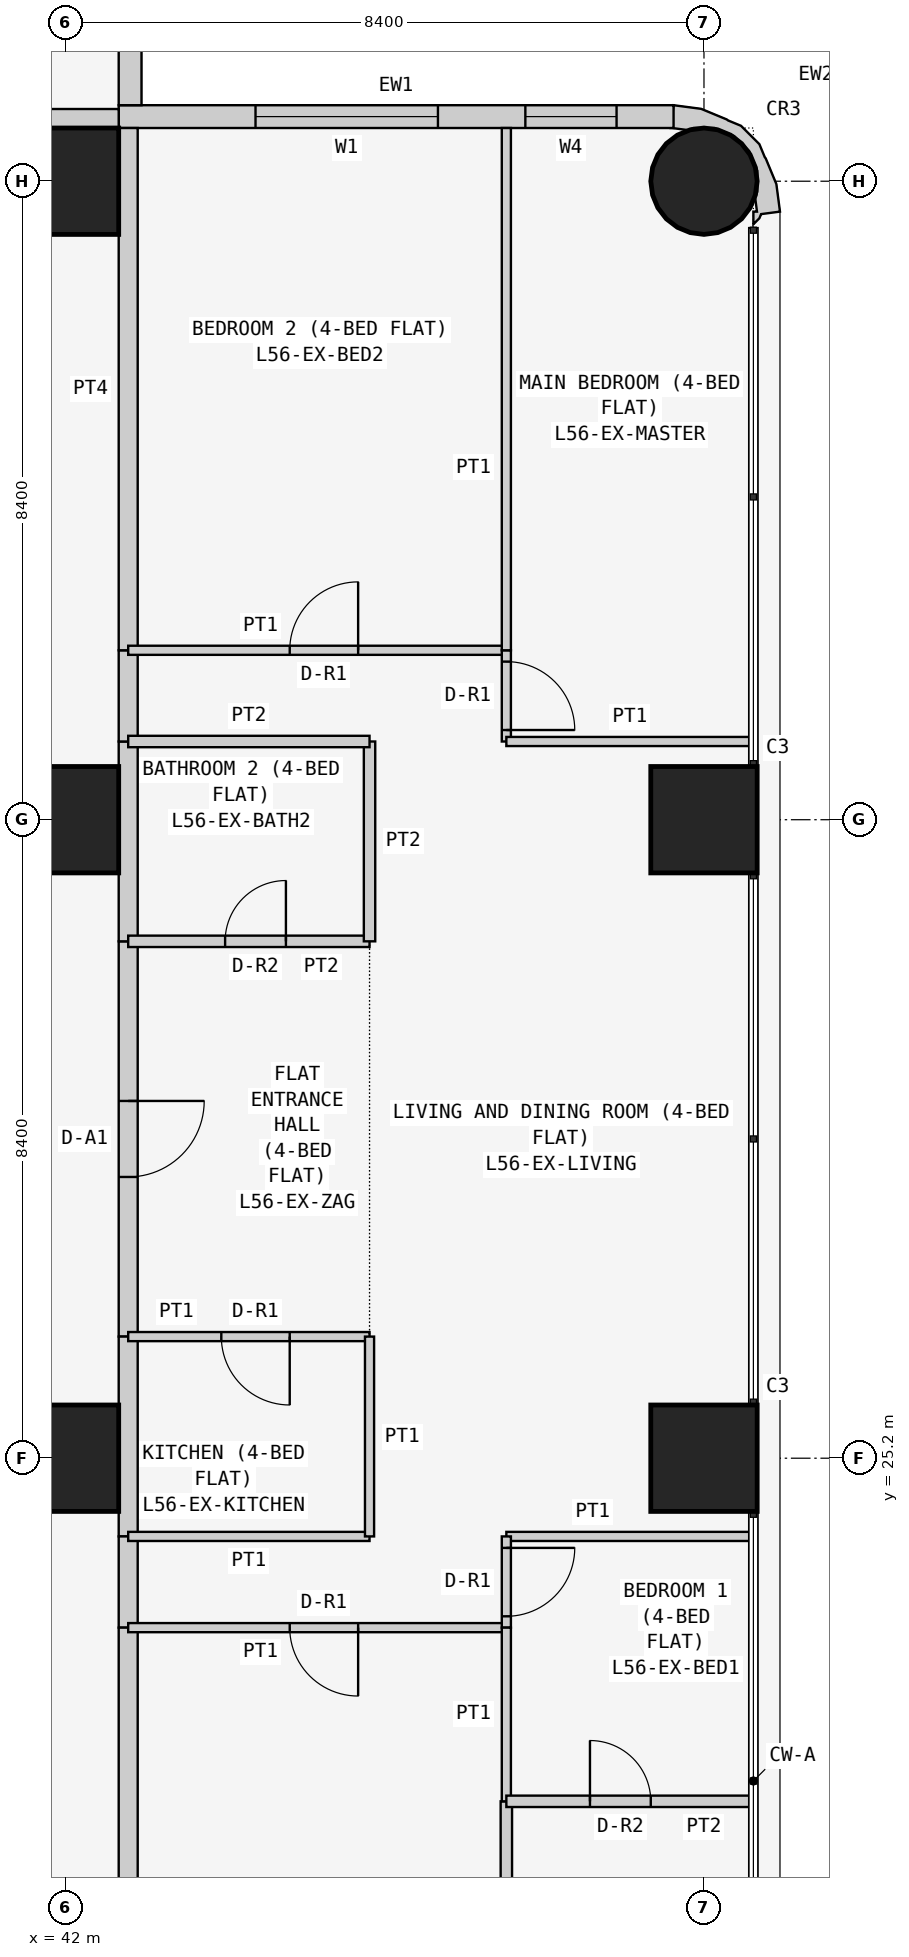
"""IFC4 building model, lengths in metres.
Left out: names, types, materials, properties, quantities, classifications, styles, units other than length and angle.
Written with IfcOpenShell. Run it as: python <this file> out.ifc"""

import sys

from ifc_helpers import new_model, si_unit, direction, frame, frame_2d, origin, origin_2d, place, context, subcontext, project, spatial, polyline, rectangle, circle, outline, extrude, element, fill, save


model = new_model("IFC4")
c1 = context("Model", 3, precision=1e-05, world=origin(), true_north=direction((0.0, 1.0)))
c2 = subcontext(c1, "Body", "Model", "MODEL_VIEW")
j1 = project(units=[si_unit("LENGTHUNIT", "METRE"), si_unit("PLANEANGLEUNIT", "RADIAN")], contexts=[c1])
p1 = place(None, origin())
s1 = spatial("IfcSite", under=j1, at=p1, CompositionType="ELEMENT")
p2 = place(p1, origin())
s2 = spatial("IfcBuilding", under=s1, at=p2, CompositionType="ELEMENT")
p3 = place(p2, frame((0.0, 0.0, 215.7)))
s3 = spatial("IfcBuildingStorey", under=s2, at=p3, CompositionType="ELEMENT", Elevation=215.7)
for number, where, z_axis, x_axis in (
    (1, (42.0, 25.2, 0.0), (0.0, 0.0, 1.0), (1.0, 0.0, 0.0)),
    (2, (42.0, 33.6, 0.0), (0.0, 0.0, 1.0), (1.0, 0.0, 0.0)),
    (3, (42.0, 42.0, 0.0), (0.0, 0.0, 1.0), (1.0, 0.0, 0.0)),
    (4, (50.4, 25.2, 0.0), (0.0, 0.0, 1.0), (1.0, 0.0, 0.0)),
    (5, (50.4, 33.6, 0.0), (0.0, 0.0, 1.0), (1.0, 0.0, 0.0)),
):
    element("IfcColumn", number, at=place(p3, frame(where, z_axis=z_axis, x_axis=x_axis)), inside=s3, PredefinedType="COLUMN", context=c2, shape_type="SweptSolid", body=[
        extrude(rectangle(XDim=1.4, YDim=1.4, at=origin_2d()), origin(), (0.0, 0.0, 1.0), 3.6),
    ])
p4 = place(p3, frame((50.4, 42.0, 0.0), z_axis=(0.0, 0.0, 1.0), x_axis=(1.0, 0.0, 0.0)))
e6 = element("IfcColumn", 6, at=p4, inside=s3, PredefinedType="COLUMN", context=c2, shape_type="SweptSolid", body=[
    extrude(circle(Radius=0.7, at=origin_2d()), origin(), (0.0, 0.0, 1.0), 3.6),
])
p5 = place(p3, frame((50.0, 42.85, 0.0), z_axis=(0.0, 0.0, 1.0), x_axis=(-1.0, 0.0, 0.0)))
e7 = element("IfcWall", 7, at=p5, inside=s3, PredefinedType="SOLIDWALL", context=c2, shape_type="SweptSolid", body=[
    extrude(rectangle(XDim=7.3, YDim=0.3, at=frame_2d((3.65, 0.0))), origin(), (0.0, 0.0, 1.0), 3.45),
])
p6 = place(p5, frame((3.1, 0.0, 0.9)))
e8 = element("IfcOpeningElement", 8, at=p6, cuts=e7, PredefinedType="OPENING", context=c2, shape_type="SweptSolid", body=[
    extrude(rectangle(XDim=2.4, YDim=1.5, at=frame_2d((1.2, 0.75))), frame((0.0, 0.16, 0.0), z_axis=(0.0, -1.0, 0.0), x_axis=(1.0, 0.0, 0.0)), (0.0, 0.0, 1.0), 0.32),
])
p7 = place(p5, frame((0.75, 0.0, 0.9)))
e9 = element("IfcOpeningElement", 9, at=p7, cuts=e7, PredefinedType="OPENING", context=c2, shape_type="SweptSolid", body=[
    extrude(rectangle(XDim=1.2, YDim=1.5, at=frame_2d((0.6, 0.75))), frame((0.0, 0.16, 0.0), z_axis=(0.0, -1.0, 0.0), x_axis=(1.0, 0.0, 0.0)), (0.0, 0.0, 1.0), 0.32),
])
p8 = place(p3, frame((42.85, 43.0, 0.0), z_axis=(0.0, 0.0, 1.0), x_axis=(0.0, 1.0, 0.0)))
e10 = element("IfcWall", 10, at=p8, inside=s3, PredefinedType="SOLIDWALL", context=c2, shape_type="SweptSolid", body=[
    extrude(rectangle(XDim=7.0, YDim=0.3, at=frame_2d((3.5, 0.0))), origin(), (0.0, 0.0, 1.0), 3.45),
])
p9 = place(p8, frame((1.5, 0.0, 0.9)))
e11 = element("IfcOpeningElement", 11, at=p9, cuts=e10, PredefinedType="OPENING", context=c2, shape_type="SweptSolid", body=[
    extrude(rectangle(XDim=2.4, YDim=1.5, at=frame_2d((1.2, 0.75))), frame((0.0, 0.16, 0.0), z_axis=(0.0, -1.0, 0.0), x_axis=(1.0, 0.0, 0.0)), (0.0, 0.0, 1.0), 0.32),
])
p10 = place(p8, frame((5.05, 0.0, 0.9)))
e12 = element("IfcOpeningElement", 12, at=p10, cuts=e10, PredefinedType="OPENING", context=c2, shape_type="SweptSolid", body=[
    extrude(rectangle(XDim=1.2, YDim=1.5, at=frame_2d((0.6, 0.75))), frame((0.0, 0.16, 0.0), z_axis=(0.0, -1.0, 0.0), x_axis=(1.0, 0.0, 0.0)), (0.0, 0.0, 1.0), 0.32),
])
p11 = place(p3, frame((50.988, 41.488, 0.0), z_axis=(0.0, 0.0, 1.0), x_axis=(0.898030234854, 0.439933741929, 0.0)))
e13 = element("IfcWall", 13, at=p11, inside=s3, PredefinedType="SOLIDWALL", context=c2, shape_type="SweptSolid", body=[
    extrude(outline(polyline([(0.138, -0.04), (0.182, -0.0), (0.419, -0.08), (0.536, 0.266), (0.559, 0.631), (0.555, 0.651), (0.566, 0.836), (0.455, 1.159), (0.333, 1.298), (0.324, 1.317), (0.082, 1.591), (-0.222, 1.793), (-0.39, 1.541), (-0.372, 1.532), (-0.195, 1.414), (-0.12, 1.41), (0.131, 1.287), (0.315, 1.078), (0.406, 0.814), (0.388, 0.536), (0.265, 0.285), (0.209, 0.235), (0.148, 0.053), (0.105, 0.074), (0.032, -0.076), (0.138, -0.04)])), origin(), (0.0, 0.0, 1.0), 3.45),
])
p12 = place(p3, frame((35.829, 42.825, 0.0), z_axis=(0.0, 0.0, 1.0), x_axis=(1.0, 0.0, 0.0)))
e14 = element("IfcWall", 14, at=p12, inside=s3, PredefinedType="PARTITIONING", context=c2, shape_type="SweptSolid", body=[
    extrude(rectangle(XDim=6.871, YDim=0.25, at=frame_2d((3.436, 0.0))), origin(), (0.0, 0.0, 1.0), 3.45),
])
p13 = place(p3, frame((42.825, 32.0, 0.0), z_axis=(0.0, 0.0, 1.0), x_axis=(0.0, -1.0, 0.0)))
e15 = element("IfcWall", 15, at=p13, inside=s3, PredefinedType="PARTITIONING", context=c2, shape_type="SweptSolid", body=[
    extrude(rectangle(XDim=5.2, YDim=0.25, at=frame_2d((2.6, 0.0))), origin(), (0.0, 0.0, 1.0), 3.45),
])
p14 = place(p13, frame((2.1, 0.0, 0.0)))
e16 = element("IfcOpeningElement", 16, at=p14, cuts=e15, PredefinedType="OPENING", context=c2, shape_type="SweptSolid", body=[
    extrude(rectangle(XDim=1.0, YDim=2.1, at=frame_2d((0.5, 1.05))), frame((0.0, 0.135, 0.0), z_axis=(0.0, -1.0, 0.0), x_axis=(1.0, 0.0, 0.0)), (0.0, 0.0, 1.0), 0.27),
])
p15 = place(p3, frame((42.825, 34.629, 0.0), z_axis=(0.0, 0.0, 1.0), x_axis=(0.0, -1.0, 0.0)))
e17 = element("IfcWall", 17, at=p15, inside=s3, PredefinedType="PARTITIONING", context=c2, shape_type="SweptSolid", body=[
    extrude(rectangle(XDim=2.629, YDim=0.25, at=frame_2d((1.314, 0.0))), origin(), (0.0, 0.0, 1.0), 3.45),
])
p16 = place(p3, frame((42.825, 26.8, 0.0), z_axis=(0.0, 0.0, 1.0), x_axis=(0.0, -1.0, 0.0)))
e18 = element("IfcWall", 18, at=p16, inside=s3, PredefinedType="PARTITIONING", context=c2, shape_type="SweptSolid", body=[
    extrude(rectangle(XDim=2.629, YDim=0.25, at=frame_2d((1.314, 0.0))), origin(), (0.0, 0.0, 1.0), 3.45),
])
p17 = place(p3, frame((42.825, 24.171, 0.0), z_axis=(0.0, 0.0, 1.0), x_axis=(0.0, -1.0, 0.0)))
e19 = element("IfcWall", 19, at=p17, inside=s3, PredefinedType="PARTITIONING", context=c2, shape_type="SweptSolid", body=[
    extrude(rectangle(XDim=1.2, YDim=0.25, at=frame_2d((0.6, 0.0))), origin(), (0.0, 0.0, 1.0), 3.45),
])
p18 = place(p3, frame((42.825, 35.829, 0.0), z_axis=(0.0, 0.0, 1.0), x_axis=(0.0, -1.0, 0.0)))
e20 = element("IfcWall", 20, at=p18, inside=s3, PredefinedType="PARTITIONING", context=c2, shape_type="SweptSolid", body=[
    extrude(rectangle(XDim=1.2, YDim=0.25, at=frame_2d((0.6, 0.0))), origin(), (0.0, 0.0, 1.0), 3.45),
])
for number, where, z_axis, x_axis in (
    (21, (42.825, 42.7, 0.0), (0.0, 0.0, 1.0), (0.0, -1.0, 0.0)),
    (22, (42.825, 22.971, 0.0), (0.0, 0.0, 1.0), (0.0, -1.0, 0.0)),
):
    element("IfcWall", number, at=place(p3, frame(where, z_axis=z_axis, x_axis=x_axis)), inside=s3, PredefinedType="PARTITIONING", context=c2, shape_type="SweptSolid", body=[
        extrude(rectangle(XDim=6.871, YDim=0.25, at=frame_2d((3.436, 0.0))), origin(), (0.0, 0.0, 1.0), 3.45),
    ])
p19 = place(p3, frame((46.0, 32.0, 0.0), z_axis=(0.0, 0.0, 1.0), x_axis=(-1.0, 0.0, 0.0)))
e23 = element("IfcWall", 23, at=p19, inside=s3, PredefinedType="PARTITIONING", context=c2, shape_type="SweptSolid", body=[
    extrude(rectangle(XDim=3.175, YDim=0.15, at=frame_2d((1.587, 0.0))), origin(), (0.0, 0.0, 1.0), 3.45),
])
p20 = place(p19, frame((1.1, 0.0, 0.0)))
e24 = element("IfcOpeningElement", 24, at=p20, cuts=e23, PredefinedType="OPENING", context=c2, shape_type="SweptSolid", body=[
    extrude(rectangle(XDim=0.8, YDim=2.1, at=frame_2d((0.4, 1.05))), frame((0.0, 0.085, 0.0), z_axis=(0.0, -1.0, 0.0), x_axis=(1.0, 0.0, 0.0)), (0.0, 0.0, 1.0), 0.17),
])
p21 = place(p3, frame((42.825, 26.8, 0.0), z_axis=(0.0, 0.0, 1.0), x_axis=(1.0, 0.0, 0.0)))
e25 = element("IfcWall", 25, at=p21, inside=s3, PredefinedType="PARTITIONING", context=c2, shape_type="SweptSolid", body=[
    extrude(rectangle(XDim=3.175, YDim=0.12, at=frame_2d((1.587, 0.0))), origin(), (0.0, 0.0, 1.0), 3.45),
])
p22 = place(p21, frame((1.225, 0.0, 0.0)))
e26 = element("IfcOpeningElement", 26, at=p22, cuts=e25, PredefinedType="OPENING", context=c2, shape_type="SweptSolid", body=[
    extrude(rectangle(XDim=0.9, YDim=2.1, at=frame_2d((0.45, 1.05))), frame((0.0, 0.07, 0.0), z_axis=(0.0, -1.0, 0.0), x_axis=(1.0, 0.0, 0.0)), (0.0, 0.0, 1.0), 0.14),
])
p23 = place(p3, frame((46.0, 32.0, 0.0), z_axis=(0.0, 0.0, 1.0), x_axis=(0.0, 1.0, 0.0)))
e27 = element("IfcWall", 27, at=p23, inside=s3, PredefinedType="PARTITIONING", context=c2, shape_type="SweptSolid", body=[
    extrude(rectangle(XDim=2.629, YDim=0.15, at=frame_2d((1.314, 0.0))), origin(), (0.0, 0.0, 1.0), 3.45),
])
p24 = place(p3, frame((46.0, 34.629, 0.0), z_axis=(0.0, 0.0, 1.0), x_axis=(-1.0, 0.0, 0.0)))
e28 = element("IfcWall", 28, at=p24, inside=s3, PredefinedType="PARTITIONING", context=c2, shape_type="SweptSolid", body=[
    extrude(rectangle(XDim=3.175, YDim=0.15, at=frame_2d((1.587, 0.0))), origin(), (0.0, 0.0, 1.0), 3.45),
])
p25 = place(p3, frame((42.825, 24.171, 0.0), z_axis=(0.0, 0.0, 1.0), x_axis=(1.0, 0.0, 0.0)))
e29 = element("IfcWall", 29, at=p25, inside=s3, PredefinedType="PARTITIONING", context=c2, shape_type="SweptSolid", body=[
    extrude(rectangle(XDim=3.175, YDim=0.12, at=frame_2d((1.587, 0.0))), origin(), (0.0, 0.0, 1.0), 3.45),
])
p26 = place(p3, frame((46.0, 24.171, 0.0), z_axis=(0.0, 0.0, 1.0), x_axis=(0.0, 1.0, 0.0)))
e30 = element("IfcWall", 30, at=p26, inside=s3, PredefinedType="PARTITIONING", context=c2, shape_type="SweptSolid", body=[
    extrude(rectangle(XDim=2.629, YDim=0.12, at=frame_2d((1.314, 0.0))), origin(), (0.0, 0.0, 1.0), 3.45),
])
p27 = place(p3, frame((42.825, 35.829, 0.0), z_axis=(0.0, 0.0, 1.0), x_axis=(1.0, 0.0, 0.0)))
e31 = element("IfcWall", 31, at=p27, inside=s3, PredefinedType="PARTITIONING", context=c2, shape_type="SweptSolid", body=[
    extrude(rectangle(XDim=4.975, YDim=0.12, at=frame_2d((2.488, 0.0))), origin(), (0.0, 0.0, 1.0), 3.45),
])
p28 = place(p27, frame((2.125, 0.0, 0.0)))
e32 = element("IfcOpeningElement", 32, at=p28, cuts=e31, PredefinedType="OPENING", context=c2, shape_type="SweptSolid", body=[
    extrude(rectangle(XDim=0.9, YDim=2.1, at=frame_2d((0.45, 1.05))), frame((0.0, 0.07, 0.0), z_axis=(0.0, -1.0, 0.0), x_axis=(1.0, 0.0, 0.0)), (0.0, 0.0, 1.0), 0.14),
])
p29 = place(p3, frame((47.8, 35.829, 0.0), z_axis=(0.0, 0.0, 1.0), x_axis=(0.0, -1.0, 0.0)))
e33 = element("IfcWall", 33, at=p29, inside=s3, PredefinedType="PARTITIONING", context=c2, shape_type="SweptSolid", body=[
    extrude(rectangle(XDim=1.2, YDim=0.12, at=frame_2d((0.6, 0.0))), origin(), (0.0, 0.0, 1.0), 3.45),
])
p30 = place(p29, frame((0.149, 0.0, 0.0)))
e34 = element("IfcOpeningElement", 34, at=p30, cuts=e33, PredefinedType="OPENING", context=c2, shape_type="SweptSolid", body=[
    extrude(rectangle(XDim=0.9, YDim=2.1, at=frame_2d((0.45, 1.05))), frame((0.0, 0.07, 0.0), z_axis=(0.0, -1.0, 0.0), x_axis=(1.0, 0.0, 0.0)), (0.0, 0.0, 1.0), 0.14),
])
p31 = place(p3, frame((47.8, 34.629, 0.0), z_axis=(0.0, 0.0, 1.0), x_axis=(1.0, 0.0, 0.0)))
e35 = element("IfcWall", 35, at=p31, inside=s3, PredefinedType="PARTITIONING", context=c2, shape_type="SweptSolid", body=[
    extrude(rectangle(XDim=3.25, YDim=0.12, at=frame_2d((1.625, 0.0))), origin(), (0.0, 0.0, 1.0), 3.45),
])
p32 = place(p3, frame((47.8, 22.971, 0.0), z_axis=(0.0, 0.0, 1.0), x_axis=(-1.0, 0.0, 0.0)))
e36 = element("IfcWall", 36, at=p32, inside=s3, PredefinedType="PARTITIONING", context=c2, shape_type="SweptSolid", body=[
    extrude(rectangle(XDim=4.975, YDim=0.12, at=frame_2d((2.488, 0.0))), origin(), (0.0, 0.0, 1.0), 3.45),
])
p33 = place(p32, frame((1.95, 0.0, 0.0)))
e37 = element("IfcOpeningElement", 37, at=p33, cuts=e36, PredefinedType="OPENING", context=c2, shape_type="SweptSolid", body=[
    extrude(rectangle(XDim=0.9, YDim=2.1, at=frame_2d((0.45, 1.05))), frame((0.0, 0.07, 0.0), z_axis=(0.0, -1.0, 0.0), x_axis=(1.0, 0.0, 0.0)), (0.0, 0.0, 1.0), 0.14),
])
p34 = place(p3, frame((51.05, 24.171, 0.0), z_axis=(0.0, 0.0, 1.0), x_axis=(-1.0, 0.0, 0.0)))
e38 = element("IfcWall", 38, at=p34, inside=s3, PredefinedType="PARTITIONING", context=c2, shape_type="SweptSolid", body=[
    extrude(rectangle(XDim=3.25, YDim=0.12, at=frame_2d((1.625, 0.0))), origin(), (0.0, 0.0, 1.0), 3.45),
])
p35 = place(p3, frame((47.8, 24.171, 0.0), z_axis=(0.0, 0.0, 1.0), x_axis=(0.0, -1.0, 0.0)))
e39 = element("IfcWall", 39, at=p35, inside=s3, PredefinedType="PARTITIONING", context=c2, shape_type="SweptSolid", body=[
    extrude(rectangle(XDim=1.2, YDim=0.12, at=frame_2d((0.6, 0.0))), origin(), (0.0, 0.0, 1.0), 3.45),
])
p36 = place(p35, frame((0.151, 0.0, 0.0)))
e40 = element("IfcOpeningElement", 40, at=p36, cuts=e39, PredefinedType="OPENING", context=c2, shape_type="SweptSolid", body=[
    extrude(rectangle(XDim=0.9, YDim=2.1, at=frame_2d((0.45, 1.05))), frame((0.0, 0.07, 0.0), z_axis=(0.0, -1.0, 0.0), x_axis=(1.0, 0.0, 0.0)), (0.0, 0.0, 1.0), 0.14),
])
p37 = place(p3, frame((47.8, 35.829, 0.0), z_axis=(0.0, 0.0, 1.0), x_axis=(0.0, 1.0, 0.0)))
e41 = element("IfcWall", 41, at=p37, inside=s3, PredefinedType="PARTITIONING", context=c2, shape_type="SweptSolid", body=[
    extrude(rectangle(XDim=6.871, YDim=0.12, at=frame_2d((3.436, 0.0))), origin(), (0.0, 0.0, 1.0), 3.45),
])
p38 = place(p3, frame((47.8, 16.1, 0.0), z_axis=(0.0, 0.0, 1.0), x_axis=(0.0, 1.0, 0.0)))
e42 = element("IfcWall", 42, at=p38, inside=s3, PredefinedType="PARTITIONING", context=c2, shape_type="SweptSolid", body=[
    extrude(rectangle(XDim=4.586, YDim=0.15, at=frame_2d((2.293, 0.0))), origin(), (0.0, 0.0, 1.0), 3.45),
])
p39 = place(p3, frame((47.8, 20.686, 0.0), z_axis=(0.0, 0.0, 1.0), x_axis=(0.0, 1.0, 0.0)))
e43 = element("IfcWall", 43, at=p39, inside=s3, PredefinedType="PARTITIONING", context=c2, shape_type="SweptSolid", body=[
    extrude(rectangle(XDim=2.285, YDim=0.12, at=frame_2d((1.143, 0.0))), origin(), (0.0, 0.0, 1.0), 3.45),
])
p40 = place(p3, frame((51.05, 20.686, 0.0), z_axis=(0.0, 0.0, 1.0), x_axis=(-1.0, 0.0, 0.0)))
e44 = element("IfcWall", 44, at=p40, inside=s3, PredefinedType="PARTITIONING", context=c2, shape_type="SweptSolid", body=[
    extrude(rectangle(XDim=3.25, YDim=0.15, at=frame_2d((1.625, 0.0))), origin(), (0.0, 0.0, 1.0), 3.45),
])
p41 = place(p40, frame((1.35, 0.0, 0.0)))
e45 = element("IfcOpeningElement", 45, at=p41, cuts=e44, PredefinedType="OPENING", context=c2, shape_type="SweptSolid", body=[
    extrude(rectangle(XDim=0.8, YDim=2.1, at=frame_2d((0.4, 1.05))), frame((0.0, 0.085, 0.0), z_axis=(0.0, -1.0, 0.0), x_axis=(1.0, 0.0, 0.0)), (0.0, 0.0, 1.0), 0.17),
])
p42 = place(p6, origin())
e46 = element("IfcWindow", 46, at=p42, inside=s3, PartitioningType="SINGLE_PANEL", PredefinedType="WINDOW", context=c2, shape_type="SweptSolid", body=[
    extrude(rectangle(XDim=2.4, YDim=1.5, at=frame_2d((1.2, 0.75))), frame((0.0, 0.03, 0.0), z_axis=(0.0, -1.0, 0.0), x_axis=(1.0, 0.0, 0.0)), (0.0, 0.0, 1.0), 0.06),
])
fill(e8, e46)
p43 = place(p7, origin())
e47 = element("IfcWindow", 47, at=p43, inside=s3, PartitioningType="SINGLE_PANEL", PredefinedType="WINDOW", context=c2, shape_type="SweptSolid", body=[
    extrude(rectangle(XDim=1.2, YDim=1.5, at=frame_2d((0.6, 0.75))), frame((0.0, 0.03, 0.0), z_axis=(0.0, -1.0, 0.0), x_axis=(1.0, 0.0, 0.0)), (0.0, 0.0, 1.0), 0.06),
])
fill(e9, e47)
p44 = place(p14, origin())
e48 = element("IfcDoor", 48, at=p44, inside=s3, OperationType="SINGLE_SWING_LEFT", PredefinedType="DOOR", context=c2, shape_type="SweptSolid", body=[
    extrude(rectangle(XDim=1.0, YDim=2.1, at=frame_2d((0.5, 1.05))), frame((0.0, 0.025, 0.0), z_axis=(0.0, -1.0, 0.0), x_axis=(1.0, 0.0, 0.0)), (0.0, 0.0, 1.0), 0.05),
])
fill(e16, e48)
p45 = place(p20, frame((0.8, 0.0, 0.0), z_axis=(0.0, 0.0, 1.0), x_axis=(-1.0, 0.0, 0.0)))
e49 = element("IfcDoor", 49, at=p45, inside=s3, OperationType="SINGLE_SWING_RIGHT", PredefinedType="DOOR", context=c2, shape_type="SweptSolid", body=[
    extrude(rectangle(XDim=0.8, YDim=2.1, at=frame_2d((0.4, 1.05))), frame((0.0, 0.025, 0.0), z_axis=(0.0, -1.0, 0.0), x_axis=(1.0, 0.0, 0.0)), (0.0, 0.0, 1.0), 0.05),
])
fill(e24, e49)
p46 = place(p22, frame((0.9, 0.0, 0.0), z_axis=(0.0, 0.0, 1.0), x_axis=(-1.0, 0.0, 0.0)))
e50 = element("IfcDoor", 50, at=p46, inside=s3, OperationType="SINGLE_SWING_LEFT", PredefinedType="DOOR", context=c2, shape_type="SweptSolid", body=[
    extrude(rectangle(XDim=0.9, YDim=2.1, at=frame_2d((0.45, 1.05))), frame((0.0, 0.025, 0.0), z_axis=(0.0, -1.0, 0.0), x_axis=(1.0, 0.0, 0.0)), (0.0, 0.0, 1.0), 0.05),
])
fill(e26, e50)
p47 = place(p28, origin())
e51 = element("IfcDoor", 51, at=p47, inside=s3, OperationType="SINGLE_SWING_RIGHT", PredefinedType="DOOR", context=c2, shape_type="SweptSolid", body=[
    extrude(rectangle(XDim=0.9, YDim=2.1, at=frame_2d((0.45, 1.05))), frame((0.0, 0.025, 0.0), z_axis=(0.0, -1.0, 0.0), x_axis=(1.0, 0.0, 0.0)), (0.0, 0.0, 1.0), 0.05),
])
fill(e32, e51)
p48 = place(p30, origin())
e52 = element("IfcDoor", 52, at=p48, inside=s3, OperationType="SINGLE_SWING_RIGHT", PredefinedType="DOOR", context=c2, shape_type="SweptSolid", body=[
    extrude(rectangle(XDim=0.9, YDim=2.1, at=frame_2d((0.45, 1.05))), frame((0.0, 0.025, 0.0), z_axis=(0.0, -1.0, 0.0), x_axis=(1.0, 0.0, 0.0)), (0.0, 0.0, 1.0), 0.05),
])
fill(e34, e52)
p49 = place(p33, origin())
e53 = element("IfcDoor", 53, at=p49, inside=s3, OperationType="SINGLE_SWING_LEFT", PredefinedType="DOOR", context=c2, shape_type="SweptSolid", body=[
    extrude(rectangle(XDim=0.9, YDim=2.1, at=frame_2d((0.45, 1.05))), frame((0.0, 0.025, 0.0), z_axis=(0.0, -1.0, 0.0), x_axis=(1.0, 0.0, 0.0)), (0.0, 0.0, 1.0), 0.05),
])
fill(e37, e53)
p50 = place(p36, origin())
e54 = element("IfcDoor", 54, at=p50, inside=s3, OperationType="SINGLE_SWING_LEFT", PredefinedType="DOOR", context=c2, shape_type="SweptSolid", body=[
    extrude(rectangle(XDim=0.9, YDim=2.1, at=frame_2d((0.45, 1.05))), frame((0.0, 0.025, 0.0), z_axis=(0.0, -1.0, 0.0), x_axis=(1.0, 0.0, 0.0)), (0.0, 0.0, 1.0), 0.05),
])
fill(e40, e54)
p51 = place(p41, frame((0.8, 0.0, 0.0), z_axis=(0.0, 0.0, 1.0), x_axis=(-1.0, 0.0, 0.0)))
e55 = element("IfcDoor", 55, at=p51, inside=s3, OperationType="SINGLE_SWING_LEFT", PredefinedType="DOOR", context=c2, shape_type="SweptSolid", body=[
    extrude(rectangle(XDim=0.8, YDim=2.1, at=frame_2d((0.4, 1.05))), frame((0.0, 0.025, 0.0), z_axis=(0.0, -1.0, 0.0), x_axis=(1.0, 0.0, 0.0)), (0.0, 0.0, 1.0), 0.05),
])
fill(e45, e55)
save(model, sys.argv[1])
